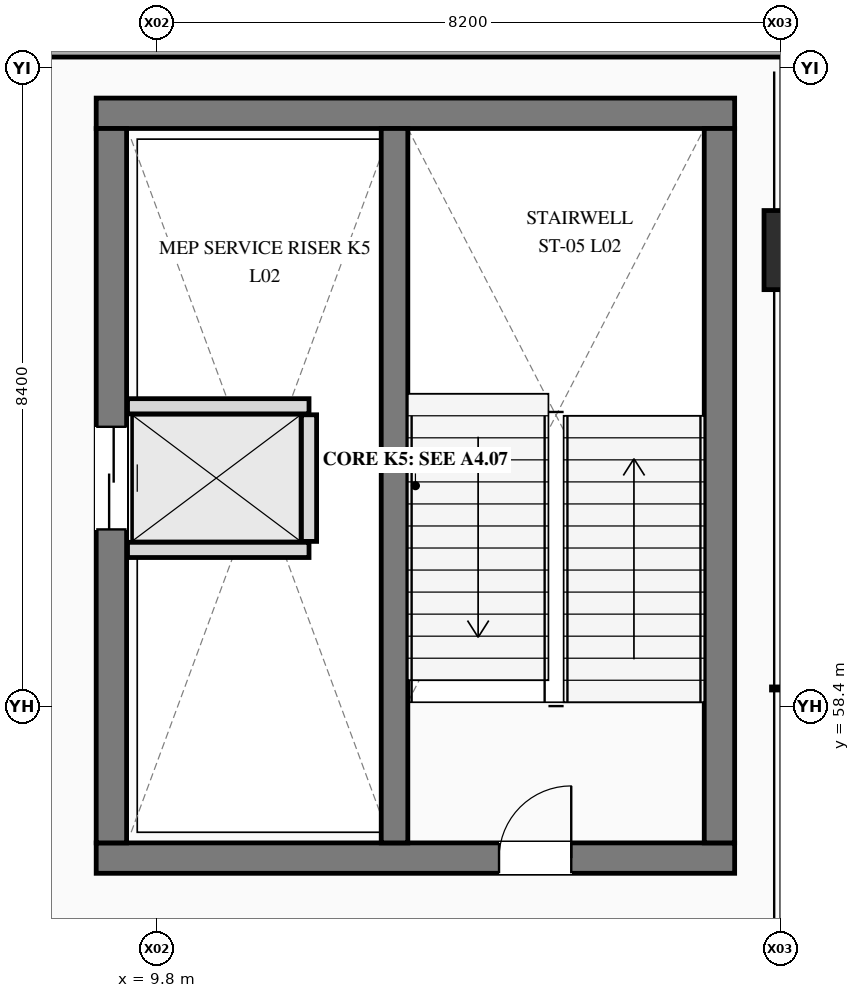
"""IFC4 building model, lengths in metres.
Left out: names, types, materials, properties, quantities, classifications, styles, units other than length and angle.
Written with IfcOpenShell. Run it as: python <this file> out.ifc"""

import sys

from ifc_helpers import new_model, si_unit, direction, frame, frame_2d, origin, origin_2d, place, context, subcontext, project, spatial, rectangle, i_section, extrude, element, fill, save


model = new_model("IFC4")
c1 = context("Model", 3, precision=1e-05, world=origin(), true_north=direction((0.0, 1.0)))
c2 = subcontext(c1, "Body", "Model", "MODEL_VIEW")
j1 = project(units=[si_unit("LENGTHUNIT", "METRE"), si_unit("PLANEANGLEUNIT", "RADIAN")], contexts=[c1])
p1 = place(None, origin())
s1 = spatial("IfcSite", under=j1, at=p1, CompositionType="ELEMENT")
p2 = place(p1, origin())
s2 = spatial("IfcBuilding", under=s1, at=p2, CompositionType="ELEMENT")
p3 = place(p2, frame((0.0, 0.0, 10.8)))
s3 = spatial("IfcBuildingStorey", under=s2, at=p3, CompositionType="ELEMENT", Elevation=10.8)
p4 = place(p3, frame((18.0, 64.4, 0.0), z_axis=(0.0, 0.0, 1.0), x_axis=(1.0, 0.0, 0.0)))
e1 = element("IfcColumn", 1, at=p4, inside=s3, PredefinedType="COLUMN", context=c2, shape_type="SweptSolid", body=[
    extrude(i_section(OverallWidth=0.427, OverallDepth=1.041, WebThickness=0.031, FlangeThickness=0.056, at=origin_2d()), origin(), (0.0, 0.0, 1.0), 4.8),
])
p5 = place(p3, frame((-0.3, 67.11, 0.0), z_axis=(0.0, 0.0, 1.0), x_axis=(1.0, 0.0, 0.0)))
e2 = element("IfcWall", 2, at=p5, inside=s3, PredefinedType="STANDARD", context=c2, shape_type="SweptSolid", body=[
    extrude(rectangle(XDim=23.1, YDim=0.34, at=frame_2d((11.55, 0.0))), origin(), (0.0, 0.0, 1.0), 4.8),
])
p6 = place(p5, frame((2.2, 0.0, 0.9)))
e3 = element("IfcOpeningElement", 3, at=p6, cuts=e2, PredefinedType="OPENING", context=c2, shape_type="SweptSolid", body=[
    extrude(rectangle(XDim=1.8, YDim=1.8, at=frame_2d((0.9, 0.9))), frame((0.0, 0.18, 0.0), z_axis=(0.0, -1.0, 0.0), x_axis=(1.0, 0.0, 0.0)), (0.0, 0.0, 1.0), 0.36),
])
p7 = place(p3, frame((9.0, 56.4, 0.0), z_axis=(0.0, 0.0, 1.0), x_axis=(1.0, 0.0, 0.0)))
e4 = element("IfcWall", 4, at=p7, inside=s3, PredefinedType="SHEAR", context=c2, shape_type="SweptSolid", body=[
    extrude(rectangle(XDim=8.4, YDim=0.4, at=frame_2d((4.2, 0.0))), origin(), (0.0, 0.0, 1.0), 4.8),
])
p8 = place(p7, frame((5.3, 0.0, 0.0)))
e5 = element("IfcOpeningElement", 5, at=p8, cuts=e4, PredefinedType="OPENING", context=c2, shape_type="SweptSolid", body=[
    extrude(rectangle(XDim=0.95, YDim=2.2, at=frame_2d((0.475, 1.1))), frame((0.0, 0.21, 0.0), z_axis=(0.0, -1.0, 0.0), x_axis=(1.0, 0.0, 0.0)), (0.0, 0.0, 1.0), 0.42),
])
p9 = place(p3, frame((17.4, 66.2, 0.0), z_axis=(0.0, 0.0, 1.0), x_axis=(-1.0, 0.0, 0.0)))
e6 = element("IfcWall", 6, at=p9, inside=s3, PredefinedType="SHEAR", context=c2, shape_type="SweptSolid", body=[
    extrude(rectangle(XDim=8.4, YDim=0.4, at=frame_2d((4.2, 0.0))), origin(), (0.0, 0.0, 1.0), 4.8),
])
p10 = place(p3, frame((9.2, 66.0, 0.0), z_axis=(0.0, 0.0, 1.0), x_axis=(0.0, -1.0, 0.0)))
e7 = element("IfcWall", 7, at=p10, inside=s3, PredefinedType="SHEAR", context=c2, shape_type="SweptSolid", body=[
    extrude(rectangle(XDim=9.4, YDim=0.4, at=frame_2d((4.7, 0.0))), origin(), (0.0, 0.0, 1.0), 4.8),
])
p11 = place(p10, frame((3.925, 0.0, 0.0)))
e8 = element("IfcOpeningElement", 8, at=p11, cuts=e7, PredefinedType="OPENING", context=c2, shape_type="SweptSolid", body=[
    extrude(rectangle(XDim=1.35, YDim=2.3, at=frame_2d((0.675, 1.15))), frame((0.0, 0.21, 0.0), z_axis=(0.0, -1.0, 0.0), x_axis=(1.0, 0.0, 0.0)), (0.0, 0.0, 1.0), 0.42),
])
p12 = place(p3, frame((17.2, 56.6, 0.0), z_axis=(0.0, 0.0, 1.0), x_axis=(0.0, 1.0, 0.0)))
e9 = element("IfcWall", 9, at=p12, inside=s3, PredefinedType="SHEAR", context=c2, shape_type="SweptSolid", body=[
    extrude(rectangle(XDim=9.4, YDim=0.4, at=frame_2d((4.7, 0.0))), origin(), (0.0, 0.0, 1.0), 4.8),
])
p13 = place(p3, frame((12.925, 56.6, 0.0), z_axis=(0.0, 0.0, 1.0), x_axis=(0.0, 1.0, 0.0)))
e10 = element("IfcWall", 10, at=p13, inside=s3, PredefinedType="SHEAR", context=c2, shape_type="SweptSolid", body=[
    extrude(rectangle(XDim=9.4, YDim=0.35, at=frame_2d((4.7, 0.0))), origin(), (0.0, 0.0, 1.0), 4.8),
])
for number, where, z_axis, x_axis in (
    (11, (9.412, 60.455, 0.0), (0.0, 0.0, 1.0), (1.0, 0.0, 0.0)),
    (12, (9.412, 62.345, 0.0), (0.0, 0.0, 1.0), (1.0, 0.0, 0.0)),
):
    element("IfcWall", number, at=place(p3, frame(where, z_axis=z_axis, x_axis=x_axis)), inside=s3, PredefinedType="PLUMBINGWALL", context=c2, shape_type="SweptSolid", body=[
        extrude(rectangle(XDim=2.388, YDim=0.2, at=frame_2d((1.194, 0.0))), origin(), (0.0, 0.0, 1.0), 4.475),
    ])
p14 = place(p3, frame((11.8, 60.567, 0.0), z_axis=(0.0, 0.0, 1.0), x_axis=(0.0, 1.0, 0.0)))
e13 = element("IfcWall", 13, at=p14, inside=s3, PredefinedType="PLUMBINGWALL", context=c2, shape_type="SweptSolid", body=[
    extrude(rectangle(XDim=1.666, YDim=0.2, at=frame_2d((0.833, 0.0))), origin(), (0.0, 0.0, 1.0), 4.475),
])
p15 = place(p8, origin())
e14 = element("IfcDoor", 14, at=p15, inside=s3, OperationType="SINGLE_SWING_RIGHT", PredefinedType="DOOR", context=c2, shape_type="SweptSolid", body=[
    extrude(rectangle(XDim=0.95, YDim=2.2, at=frame_2d((0.475, 1.1))), frame((0.0, 0.025, 0.0), z_axis=(0.0, -1.0, 0.0), x_axis=(1.0, 0.0, 0.0)), (0.0, 0.0, 1.0), 0.05),
])
fill(e5, e14)
p16 = place(p11, origin())
e15 = element("IfcDoor", 15, at=p16, inside=s3, OperationType="SLIDING_TO_LEFT", PredefinedType="DOOR", context=c2, shape_type="SweptSolid", body=[
    extrude(rectangle(XDim=1.35, YDim=2.3, at=frame_2d((0.675, 1.15))), frame((0.0, 0.025, 0.0), z_axis=(0.0, -1.0, 0.0), x_axis=(1.0, 0.0, 0.0)), (0.0, 0.0, 1.0), 0.05),
])
fill(e8, e15)
save(model, sys.argv[1])
